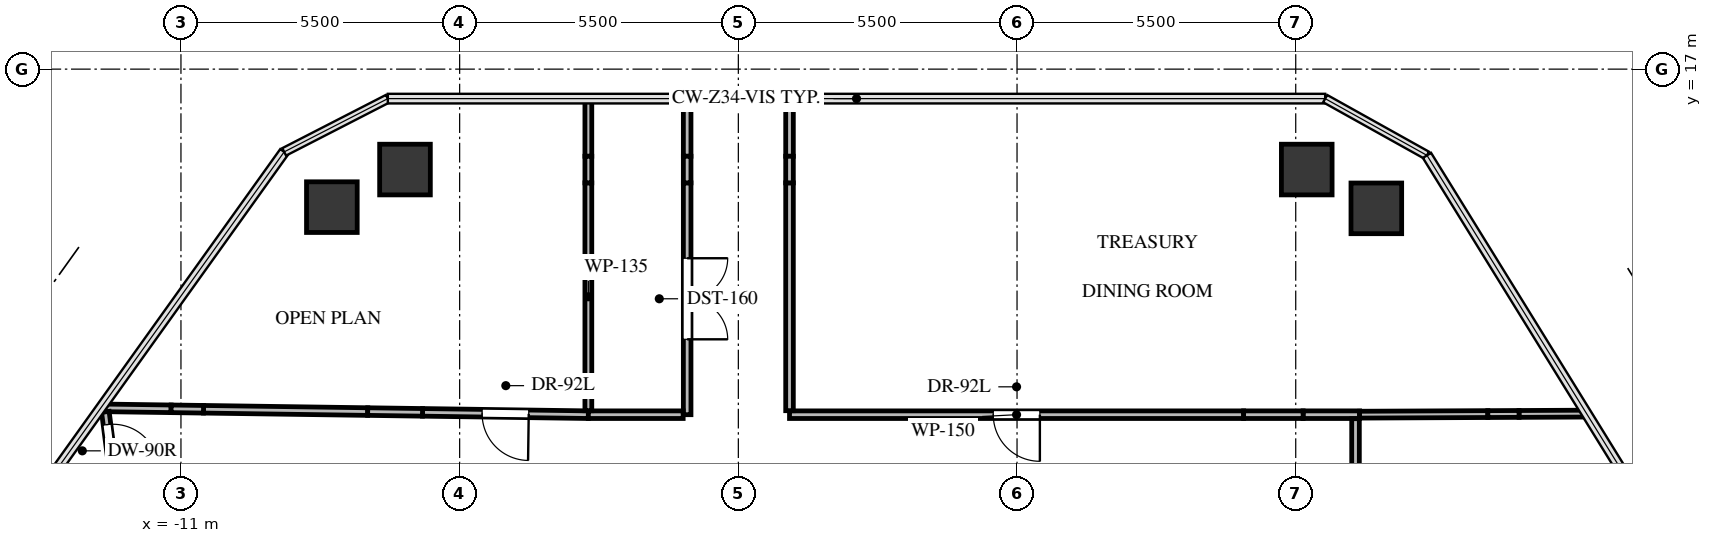
"""IFC4 building model, lengths in metres.
Left out: names, types, materials, properties, quantities, classifications, styles, units other than length and angle.
Written with IfcOpenShell. Run it as: python <this file> out.ifc"""

import sys

from ifc_helpers import new_model, si_unit, direction, frame, frame_2d, origin, origin_2d, place, context, subcontext, project, spatial, rectangle, extrude, source, transform, mapped, element, fill, save


model = new_model("IFC4")
c1 = context("Model", 3, precision=1e-05, world=origin(), true_north=direction((0.0, 1.0)))
c2 = subcontext(c1, "Body", "Model", "MODEL_VIEW")
j1 = project(units=[si_unit("LENGTHUNIT", "METRE"), si_unit("PLANEANGLEUNIT", "RADIAN")], contexts=[c1])
p1 = place(None, origin())
s1 = spatial("IfcSite", under=j1, at=p1, CompositionType="ELEMENT")
p2 = place(p1, origin())
s2 = spatial("IfcBuilding", under=s1, at=p2, CompositionType="ELEMENT")
p3 = place(p2, frame((0.0, 0.0, 200.2)))
s3 = spatial("IfcBuildingStorey", under=s2, at=p3, CompositionType="ELEMENT", Elevation=200.2)
m1 = source(origin(), c2, "Body", "SweptSolid", [
    extrude(rectangle(XDim=1.0, YDim=1.0, at=origin_2d()), origin(), (0.0, 0.0, 1.0), 3.0),
])
for number, where, z_axis, x_axis in (
    (1, (-8.022, 14.276, -0.24), (0.0, 0.0, 1.0), (1.0, 0.0, 0.0)),
    (2, (-6.579, 15.018, -0.24), (0.0, 0.0, 1.0), (1.0, 0.0, 0.0)),
    (3, (11.218, 15.018, -0.24), (0.0, 0.0, 1.0), (1.0, 0.0, 0.0)),
    (4, (12.591, 14.252, -0.24), (0.0, 0.0, 1.0), (1.0, 0.0, 0.0)),
):
    element("IfcColumn", number, at=place(p3, frame(where, z_axis=z_axis, x_axis=x_axis)), inside=s3, PredefinedType="COLUMN", context=c2, shape_type="MappedRepresentation", body=[
        mapped(m1, transform((0.0, 0.0, 0.0), x_axis=(1.0, 0.0, 0.0), y_axis=(0.0, 1.0, 0.0), z_axis=(0.0, 0.0, 1.0), scale=1.0)),
    ])
p4 = place(p3, frame((-2.96, 10.18, 0.0), z_axis=(0.0, 0.0, 1.0), x_axis=(-0.999900650504, 0.014095712907, 0.0)))
e5 = element("IfcWall", 5, at=p4, inside=s3, PredefinedType="PARTITIONING", context=c2, shape_type="SweptSolid", body=[
    extrude(rectangle(XDim=3.273, YDim=0.15, at=frame_2d((1.637, 0.0))), origin(), (0.0, 0.0, 1.0), 2.308),
])
p5 = place(p4, frame((1.177, 0.0, 0.0)))
e6 = element("IfcOpeningElement", 6, at=p5, cuts=e5, PredefinedType="OPENING", context=c2, shape_type="SweptSolid", body=[
    extrude(rectangle(XDim=0.92, YDim=2.1, at=frame_2d((0.46, 1.05))), frame((0.0, 0.085, 0.0), z_axis=(0.0, -1.0, 0.0), x_axis=(1.0, 0.0, 0.0)), (0.0, 0.0, 1.0), 0.17),
])
p6 = place(p3, frame((-7.315, 10.241, 0.0), z_axis=(0.0, 0.0, 1.0), x_axis=(-0.99990075336, 0.014088414774, 0.0)))
e7 = element("IfcWall", 7, at=p6, inside=s3, PredefinedType="PARTITIONING", context=c2, shape_type="SweptSolid", body=[
    extrude(rectangle(XDim=3.24, YDim=0.15, at=frame_2d((1.62, 0.0))), origin(), (0.0, 0.0, 1.0), 2.745),
])
p7 = place(p3, frame((-11.194, 10.296, 0.0), z_axis=(0.0, 0.0, 1.0), x_axis=(-0.999900583231, 0.014100484163, 0.0)))
e8 = element("IfcWall", 8, at=p7, inside=s3, PredefinedType="PARTITIONING", context=c2, shape_type="SweptSolid", body=[
    extrude(rectangle(XDim=1.385, YDim=0.15, at=frame_2d((0.693, 0.0))), origin(), (0.0, 0.0, 1.0), 2.745),
])
p8 = place(p3, frame((-6.233, 10.226, 0.0), z_axis=(0.0, 0.0, 1.0), x_axis=(-0.999898893801, 0.014219781108, 0.0)))
e9 = element("IfcWall", 9, at=p8, inside=s3, PredefinedType="PARTITIONING", context=c2, shape_type="SweptSolid", body=[
    extrude(rectangle(XDim=1.082, YDim=0.15, at=frame_2d((0.541, 0.0))), origin(), (0.0, 0.0, 1.0), 1.942),
])
p9 = place(p3, frame((-10.555, 10.287, 0.0), z_axis=(0.0, 0.0, 1.0), x_axis=(-0.999900221389, 0.014126119966, 0.0)))
e10 = element("IfcWall", 10, at=p9, inside=s3, PredefinedType="PARTITIONING", context=c2, shape_type="SweptSolid", body=[
    extrude(rectangle(XDim=0.639, YDim=0.15, at=frame_2d((0.32, 0.0))), origin(), (0.0, 0.0, 1.0), 2.099),
])
p10 = place(p3, frame((-1.01, 16.418, 0.0), z_axis=(0.0, 0.0, 1.0), x_axis=(0.0, -1.0, 0.0)))
e11 = element("IfcWall", 11, at=p10, inside=s3, PredefinedType="PARTITIONING", context=c2, shape_type="SweptSolid", body=[
    extrude(rectangle(XDim=1.137, YDim=0.15, at=frame_2d((0.569, 0.0))), origin(), (0.0, 0.0, 1.0), 2.745),
])
p11 = place(p3, frame((-1.01, 14.755, 0.0), z_axis=(0.0, 0.0, 1.0), x_axis=(0.0, -1.0, 0.0)))
e12 = element("IfcWall", 12, at=p11, inside=s3, PredefinedType="PARTITIONING", context=c2, shape_type="SweptSolid", body=[
    extrude(rectangle(XDim=4.575, YDim=0.15, at=frame_2d((2.288, 0.0))), origin(), (0.0, 0.0, 1.0), 2.745),
])
p12 = place(p11, frame((1.488, 0.0, 0.0)))
e13 = element("IfcOpeningElement", 13, at=p12, cuts=e12, PredefinedType="OPENING", context=c2, shape_type="SweptSolid", body=[
    extrude(rectangle(XDim=1.6, YDim=2.15, at=frame_2d((0.8, 1.075))), frame((0.0, 0.085, 0.0), z_axis=(0.0, -1.0, 0.0), x_axis=(1.0, 0.0, 0.0)), (0.0, 0.0, 1.0), 0.17),
])
p13 = place(p3, frame((-1.01, 15.281, 0.0), z_axis=(0.0, 0.0, 1.0), x_axis=(0.0, -1.0, 0.0)))
e14 = element("IfcWall", 14, at=p13, inside=s3, PredefinedType="PARTITIONING", context=c2, shape_type="SweptSolid", body=[
    extrude(rectangle(XDim=0.525, YDim=0.15, at=frame_2d((0.263, 0.0))), origin(), (0.0, 0.0, 1.0), 2.099),
])
p14 = place(p3, frame((-1.089, 10.18, 0.0), z_axis=(0.0, 0.0, 1.0), x_axis=(-1.0, 0.0, 0.0)))
e15 = element("IfcWall", 15, at=p14, inside=s3, PredefinedType="PARTITIONING", context=c2, shape_type="SweptSolid", body=[
    extrude(rectangle(XDim=1.871, YDim=0.15, at=frame_2d((0.936, 0.0))), origin(), (0.0, 0.0, 1.0), 2.745),
])
p15 = place(p3, frame((12.26, 10.18, 0.0), z_axis=(0.0, 0.0, 1.0), x_axis=(-1.0, 0.0, 0.0)))
e16 = element("IfcWall", 16, at=p15, inside=s3, PredefinedType="PARTITIONING", context=c2, shape_type="SweptSolid", body=[
    extrude(rectangle(XDim=1.114, YDim=0.15, at=frame_2d((0.557, 0.0))), origin(), (0.0, 0.0, 1.0), 2.745),
])
p16 = place(p3, frame((9.971, 10.18, 0.0), z_axis=(0.0, 0.0, 1.0), x_axis=(-1.0, 0.0, 0.0)))
e17 = element("IfcWall", 17, at=p16, inside=s3, PredefinedType="PARTITIONING", context=c2, shape_type="SweptSolid", body=[
    extrude(rectangle(XDim=8.961, YDim=0.15, at=frame_2d((4.481, 0.0))), origin(), (0.0, 0.0, 1.0), 2.308),
])
p17 = place(p16, frame((4.021, 0.0, 0.0)))
e18 = element("IfcOpeningElement", 18, at=p17, cuts=e17, PredefinedType="OPENING", context=c2, shape_type="SweptSolid", body=[
    extrude(rectangle(XDim=0.92, YDim=2.1, at=frame_2d((0.46, 1.05))), frame((0.0, 0.085, 0.0), z_axis=(0.0, -1.0, 0.0), x_axis=(1.0, 0.0, 0.0)), (0.0, 0.0, 1.0), 0.17),
])
p18 = place(p3, frame((11.146, 10.18, 0.0), z_axis=(0.0, 0.0, 1.0), x_axis=(-1.0, 0.0, 0.0)))
e19 = element("IfcWall", 19, at=p18, inside=s3, PredefinedType="PARTITIONING", context=c2, shape_type="SweptSolid", body=[
    extrude(rectangle(XDim=1.174, YDim=0.15, at=frame_2d((0.587, 0.0))), origin(), (0.0, 0.0, 1.0), 1.942),
])
p19 = place(p3, frame((1.01, 10.259, 0.0), z_axis=(0.0, 0.0, 1.0), x_axis=(0.0, 1.0, 0.0)))
e20 = element("IfcWall", 20, at=p19, inside=s3, PredefinedType="PARTITIONING", context=c2, shape_type="SweptSolid", body=[
    extrude(rectangle(XDim=4.496, YDim=0.15, at=frame_2d((2.248, 0.0))), origin(), (0.0, 0.0, 1.0), 2.745),
])
p20 = place(p3, frame((1.01, 15.281, 0.0), z_axis=(0.0, 0.0, 1.0), x_axis=(0.0, 1.0, 0.0)))
e21 = element("IfcWall", 21, at=p20, inside=s3, PredefinedType="PARTITIONING", context=c2, shape_type="SweptSolid", body=[
    extrude(rectangle(XDim=1.137, YDim=0.15, at=frame_2d((0.569, 0.0))), origin(), (0.0, 0.0, 1.0), 2.745),
])
p21 = place(p3, frame((1.01, 14.755, 0.0), z_axis=(0.0, 0.0, 1.0), x_axis=(0.0, 1.0, 0.0)))
e22 = element("IfcWall", 22, at=p21, inside=s3, PredefinedType="PARTITIONING", context=c2, shape_type="SweptSolid", body=[
    extrude(rectangle(XDim=0.525, YDim=0.15, at=frame_2d((0.263, 0.0))), origin(), (0.0, 0.0, 1.0), 2.099),
])
p22 = place(p3, frame((-12.492, 10.235, 0.0), z_axis=(0.0, 0.0, 1.0), x_axis=(0.129435611613, -0.991587828912, 0.0)))
e23 = element("IfcWall", 23, at=p22, inside=s3, PredefinedType="PARTITIONING", context=c2, shape_type="SweptSolid", body=[
    extrude(rectangle(XDim=1.407, YDim=0.15, at=frame_2d((0.704, 0.0))), origin(), (0.0, 0.0, 1.0), 2.745),
])
p23 = place(p22, frame((0.254, 0.0, 0.0)))
e24 = element("IfcOpeningElement", 24, at=p23, cuts=e23, PredefinedType="OPENING", context=c2, shape_type="SweptSolid", body=[
    extrude(rectangle(XDim=0.9, YDim=2.05, at=frame_2d((0.45, 1.025))), frame((0.0, 0.085, 0.0), z_axis=(0.0, -1.0, 0.0), x_axis=(1.0, 0.0, 0.0)), (0.0, 0.0, 1.0), 0.17),
])
p24 = place(p3, frame((12.18, 2.49, 0.0), z_axis=(0.0, 0.0, 1.0), x_axis=(0.0, 1.0, 0.0)))
e25 = element("IfcWall", 25, at=p24, inside=s3, PredefinedType="PARTITIONING", context=c2, shape_type="SweptSolid", body=[
    extrude(rectangle(XDim=7.611, YDim=0.15, at=frame_2d((3.806, 0.0))), origin(), (0.0, 0.0, 1.0), 2.745),
])
p25 = place(p24, frame((3.331, 0.0, 0.0)))
e26 = element("IfcOpeningElement", 26, at=p25, cuts=e25, PredefinedType="OPENING", context=c2, shape_type="SweptSolid", body=[
    extrude(rectangle(XDim=0.95, YDim=2.1, at=frame_2d((0.475, 1.05))), frame((0.0, 0.085, 0.0), z_axis=(0.0, -1.0, 0.0), x_axis=(1.0, 0.0, 0.0)), (0.0, 0.0, 1.0), 0.17),
])
p26 = place(p3, frame((-2.96, 16.418, 0.0), z_axis=(0.0, 0.0, 1.0), x_axis=(0.0, -1.0, 0.0)))
e27 = element("IfcWall", 27, at=p26, inside=s3, PredefinedType="PARTITIONING", context=c2, shape_type="SweptSolid", body=[
    extrude(rectangle(XDim=1.137, YDim=0.135, at=frame_2d((0.569, 0.0))), origin(), (0.0, 0.0, 1.0), 2.745),
])
p27 = place(p3, frame((-2.96, 14.755, 0.0), z_axis=(0.0, 0.0, 1.0), x_axis=(0.0, -1.0, 0.0)))
e28 = element("IfcWall", 28, at=p27, inside=s3, PredefinedType="PARTITIONING", context=c2, shape_type="SweptSolid", body=[
    extrude(rectangle(XDim=4.496, YDim=0.135, at=frame_2d((2.248, 0.0))), origin(), (0.0, 0.0, 1.0), 2.745),
])
p28 = place(p3, frame((-2.96, 15.281, 0.0), z_axis=(0.0, 0.0, 1.0), x_axis=(0.0, -1.0, 0.0)))
e29 = element("IfcWall", 29, at=p28, inside=s3, PredefinedType="PARTITIONING", context=c2, shape_type="SweptSolid", body=[
    extrude(rectangle(XDim=0.525, YDim=0.135, at=frame_2d((0.263, 0.0))), origin(), (0.0, 0.0, 1.0), 2.099),
])
p29 = place(p3, frame((16.74, 10.201, 0.0), z_axis=(0.0, 0.0, 1.0), x_axis=(-0.999989521507, -0.004577868163, 0.0)))
e30 = element("IfcWall", 30, at=p29, inside=s3, PredefinedType="PARTITIONING", context=c2, shape_type="SweptSolid", body=[
    extrude(rectangle(XDim=1.333, YDim=0.135, at=frame_2d((0.667, 0.0))), origin(), (0.0, 0.0, 1.0), 2.745),
])
p30 = place(p3, frame((14.791, 10.192, 0.0), z_axis=(0.0, 0.0, 1.0), x_axis=(-0.999989725302, -0.004533132435, 0.0)))
e31 = element("IfcWall", 31, at=p30, inside=s3, PredefinedType="PARTITIONING", context=c2, shape_type="SweptSolid", body=[
    extrude(rectangle(XDim=2.531, YDim=0.135, at=frame_2d((1.266, 0.0))), origin(), (0.0, 0.0, 1.0), 2.745),
])
p31 = place(p3, frame((15.407, 10.195, 0.0), z_axis=(0.0, 0.0, 1.0), x_axis=(-0.999988671317, -0.004759961942, 0.0)))
e32 = element("IfcWall", 32, at=p31, inside=s3, PredefinedType="PARTITIONING", context=c2, shape_type="SweptSolid", body=[
    extrude(rectangle(XDim=0.615, YDim=0.135, at=frame_2d((0.308, 0.0))), origin(), (0.0, 0.0, 1.0), 2.099),
])
m2 = source(origin(), c2, "Body", "SweptSolid", [
    extrude(rectangle(XDim=0.92, YDim=2.1, at=frame_2d((0.46, 1.05))), frame((0.0, 0.025, 0.0), z_axis=(0.0, -1.0, 0.0), x_axis=(1.0, 0.0, 0.0)), (0.0, 0.0, 1.0), 0.05),
])
p32 = place(p5, origin())
e33 = element("IfcDoor", 33, at=p32, inside=s3, OperationType="SINGLE_SWING_LEFT", PredefinedType="DOOR", context=c2, shape_type="MappedRepresentation", body=[
    mapped(m2, transform((0.0, 0.0, 0.0), x_axis=(1.0, 0.0, 0.0), y_axis=(0.0, 1.0, 0.0), z_axis=(0.0, 0.0, 1.0), scale=1.0)),
])
fill(e6, e33)
m3 = source(origin(), c2, "Body", "SweptSolid", [
    extrude(rectangle(XDim=1.6, YDim=2.15, at=frame_2d((0.8, 1.075))), frame((0.0, 0.025, 0.0), z_axis=(0.0, -1.0, 0.0), x_axis=(1.0, 0.0, 0.0)), (0.0, 0.0, 1.0), 0.05),
])
p33 = place(p12, origin())
e34 = element("IfcDoor", 34, at=p33, inside=s3, OperationType="DOUBLE_DOOR_SINGLE_SWING", PredefinedType="DOOR", context=c2, shape_type="MappedRepresentation", body=[
    mapped(m3, transform((0.0, 0.0, 0.0), x_axis=(1.0, 0.0, 0.0), y_axis=(0.0, 1.0, 0.0), z_axis=(0.0, 0.0, 1.0), scale=1.0)),
])
fill(e13, e34)
p34 = place(p17, origin())
e35 = element("IfcDoor", 35, at=p34, inside=s3, OperationType="SINGLE_SWING_LEFT", PredefinedType="DOOR", context=c2, shape_type="MappedRepresentation", body=[
    mapped(m2, transform((0.0, 0.0, 0.0), x_axis=(1.0, 0.0, 0.0), y_axis=(0.0, 1.0, 0.0), z_axis=(0.0, 0.0, 1.0), scale=1.0)),
])
fill(e18, e35)
m4 = source(origin(), c2, "Body", "SweptSolid", [
    extrude(rectangle(XDim=0.9, YDim=2.05, at=frame_2d((0.45, 1.025))), frame((0.0, 0.025, 0.0), z_axis=(0.0, -1.0, 0.0), x_axis=(1.0, 0.0, 0.0)), (0.0, 0.0, 1.0), 0.05),
])
p35 = place(p23, origin())
e36 = element("IfcDoor", 36, at=p35, inside=s3, OperationType="SINGLE_SWING_RIGHT", PredefinedType="DOOR", context=c2, shape_type="MappedRepresentation", body=[
    mapped(m4, transform((0.0, 0.0, 0.0), x_axis=(1.0, 0.0, 0.0), y_axis=(0.0, 1.0, 0.0), z_axis=(0.0, 0.0, 1.0), scale=1.0)),
])
fill(e24, e36)
save(model, sys.argv[1])
